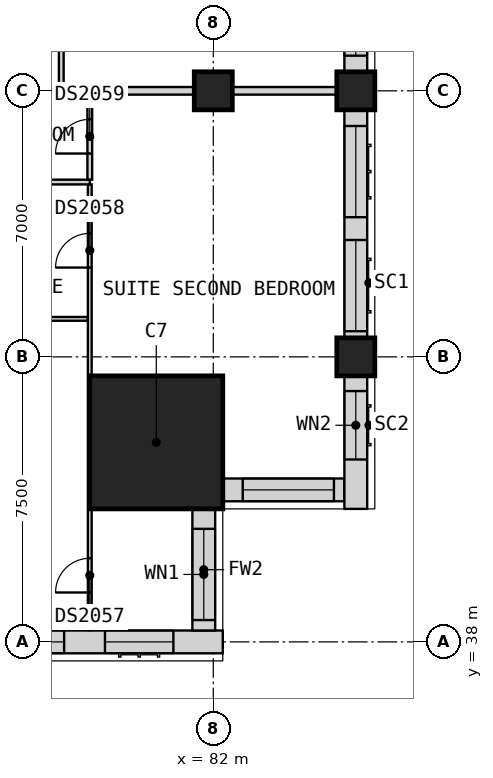
"""IFC4 building model, lengths in metres.
Left out: names, types, materials, properties, quantities, classifications, styles, units other than length and angle.
Written with IfcOpenShell. Run it as: python <this file> out.ifc"""

import sys

from ifc_helpers import new_model, si_unit, direction, frame, frame_2d, origin, origin_2d, place, context, subcontext, project, spatial, rectangle, extrude, element, fill, save


model = new_model("IFC4")
c1 = context("Model", 3, precision=1e-05, world=origin(), true_north=direction((0.0, 1.0)))
c2 = subcontext(c1, "Body", "Model", "MODEL_VIEW")
j1 = project(units=[si_unit("LENGTHUNIT", "METRE"), si_unit("PLANEANGLEUNIT", "RADIAN")], contexts=[c1])
p1 = place(None, origin())
s1 = spatial("IfcSite", under=j1, at=p1, CompositionType="ELEMENT")
p2 = place(p1, origin())
s2 = spatial("IfcBuilding", under=s1, at=p2, CompositionType="ELEMENT")
p3 = place(p2, frame((0.0, 0.0, 162.6)))
s3 = spatial("IfcBuildingStorey", under=s2, at=p3, CompositionType="ELEMENT", Elevation=162.6)
for number, where, z_axis, x_axis in (
    (1, (85.75, 45.5, 0.0), (0.0, 0.0, 1.0), (1.0, 0.0, 0.0)),
    (2, (85.75, 52.5, 0.0), (0.0, 0.0, 1.0), (1.0, 0.0, 0.0)),
    (3, (82.0, 52.5, 0.0), (0.0, 0.0, 1.0), (1.0, 0.0, 0.0)),
):
    element("IfcColumn", number, at=place(p3, frame(where, z_axis=z_axis, x_axis=x_axis)), inside=s3, PredefinedType="COLUMN", context=c2, shape_type="SweptSolid", body=[
        extrude(rectangle(XDim=1.0, YDim=1.0, at=origin_2d()), origin(), (0.0, 0.0, 1.0), 3.6),
    ])
p4 = place(p3, frame((80.5, 43.25, 0.0), z_axis=(0.0, 0.0, 1.0), x_axis=(1.0, 0.0, 0.0)))
e4 = element("IfcColumn", 4, at=p4, inside=s3, PredefinedType="COLUMN", context=c2, shape_type="SweptSolid", body=[
    extrude(rectangle(XDim=3.5, YDim=3.5, at=origin_2d()), origin(), (0.0, 0.0, 1.0), 3.6),
])
p5 = place(p3, frame((75.0, 38.0, 0.0), z_axis=(0.0, 0.0, 1.0), x_axis=(1.0, 0.0, 0.0)))
e5 = element("IfcWall", 5, at=p5, inside=s3, PredefinedType="SOLIDWALL", context=c2, shape_type="SweptSolid", body=[
    extrude(rectangle(XDim=7.25, YDim=0.6, at=frame_2d((3.625, 0.0))), origin(), (0.0, 0.0, 1.0), 2.85),
])
p6 = place(p5, frame((0.675, 0.0, 0.8)))
e6 = element("IfcOpeningElement", 6, at=p6, cuts=e5, PredefinedType="OPENING", context=c2, shape_type="SweptSolid", body=[
    extrude(rectangle(XDim=2.4, YDim=1.8, at=frame_2d((1.2, 0.9))), frame((0.0, 0.31, 0.0), z_axis=(0.0, -1.0, 0.0), x_axis=(1.0, 0.0, 0.0)), (0.0, 0.0, 1.0), 0.62),
])
p7 = place(p5, frame((4.15, 0.0, 0.8)))
e7 = element("IfcOpeningElement", 7, at=p7, cuts=e5, PredefinedType="OPENING", context=c2, shape_type="SweptSolid", body=[
    extrude(rectangle(XDim=1.8, YDim=1.8, at=frame_2d((0.9, 0.9))), frame((0.0, 0.31, 0.0), z_axis=(0.0, -1.0, 0.0), x_axis=(1.0, 0.0, 0.0)), (0.0, 0.0, 1.0), 0.62),
])
p8 = place(p3, frame((81.75, 38.3, 0.0), z_axis=(0.0, 0.0, 1.0), x_axis=(0.0, 1.0, 0.0)))
e8 = element("IfcWall", 8, at=p8, inside=s3, PredefinedType="SOLIDWALL", context=c2, shape_type="SweptSolid", body=[
    extrude(rectangle(XDim=3.2, YDim=0.6, at=frame_2d((1.6, 0.0))), origin(), (0.0, 0.0, 1.0), 3.2),
])
p9 = place(p8, frame((0.275, 0.0, 0.8)))
e9 = element("IfcOpeningElement", 9, at=p9, cuts=e8, PredefinedType="OPENING", context=c2, shape_type="SweptSolid", body=[
    extrude(rectangle(XDim=2.4, YDim=1.8, at=frame_2d((1.2, 0.9))), frame((0.0, 0.31, 0.0), z_axis=(0.0, -1.0, 0.0), x_axis=(1.0, 0.0, 0.0)), (0.0, 0.0, 1.0), 0.62),
])
p10 = place(p3, frame((82.25, 42.0, 0.0), z_axis=(0.0, 0.0, 1.0), x_axis=(1.0, 0.0, 0.0)))
e10 = element("IfcWall", 10, at=p10, inside=s3, PredefinedType="SOLIDWALL", context=c2, shape_type="SweptSolid", body=[
    extrude(rectangle(XDim=3.2, YDim=0.6, at=frame_2d((1.6, 0.0))), origin(), (0.0, 0.0, 1.0), 3.2),
])
p11 = place(p10, frame((0.525, 0.0, 0.8)))
e11 = element("IfcOpeningElement", 11, at=p11, cuts=e10, PredefinedType="OPENING", context=c2, shape_type="SweptSolid", body=[
    extrude(rectangle(XDim=2.4, YDim=1.8, at=frame_2d((1.2, 0.9))), frame((0.0, 0.31, 0.0), z_axis=(0.0, -1.0, 0.0), x_axis=(1.0, 0.0, 0.0)), (0.0, 0.0, 1.0), 0.62),
])
p12 = place(p3, frame((85.75, 41.5, 0.0), z_axis=(0.0, 0.0, 1.0), x_axis=(0.0, 1.0, 0.0)))
e12 = element("IfcWall", 12, at=p12, inside=s3, PredefinedType="SOLIDWALL", context=c2, shape_type="SweptSolid", body=[
    extrude(rectangle(XDim=3.5, YDim=0.6, at=frame_2d((1.75, 0.0))), origin(), (0.0, 0.0, 1.0), 3.2),
])
p13 = place(p12, frame((1.3, 0.0, 0.8)))
e13 = element("IfcOpeningElement", 13, at=p13, cuts=e12, PredefinedType="OPENING", context=c2, shape_type="SweptSolid", body=[
    extrude(rectangle(XDim=1.8, YDim=1.8, at=frame_2d((0.9, 0.9))), frame((0.0, 0.31, 0.0), z_axis=(0.0, -1.0, 0.0), x_axis=(1.0, 0.0, 0.0)), (0.0, 0.0, 1.0), 0.62),
])
p14 = place(p3, frame((85.75, 46.0, 0.0), z_axis=(0.0, 0.0, 1.0), x_axis=(0.0, 1.0, 0.0)))
e14 = element("IfcWall", 14, at=p14, inside=s3, PredefinedType="SOLIDWALL", context=c2, shape_type="SweptSolid", body=[
    extrude(rectangle(XDim=6.0, YDim=0.6, at=frame_2d((3.0, 0.0))), origin(), (0.0, 0.0, 1.0), 2.85),
])
p15 = place(p14, frame((0.175, 0.0, 0.8)))
e15 = element("IfcOpeningElement", 15, at=p15, cuts=e14, PredefinedType="OPENING", context=c2, shape_type="SweptSolid", body=[
    extrude(rectangle(XDim=2.4, YDim=1.8, at=frame_2d((1.2, 0.9))), frame((0.0, 0.31, 0.0), z_axis=(0.0, -1.0, 0.0), x_axis=(1.0, 0.0, 0.0)), (0.0, 0.0, 1.0), 0.62),
])
p16 = place(p14, frame((3.175, 0.0, 0.8)))
e16 = element("IfcOpeningElement", 16, at=p16, cuts=e14, PredefinedType="OPENING", context=c2, shape_type="SweptSolid", body=[
    extrude(rectangle(XDim=2.4, YDim=1.8, at=frame_2d((1.2, 0.9))), frame((0.0, 0.31, 0.0), z_axis=(0.0, -1.0, 0.0), x_axis=(1.0, 0.0, 0.0)), (0.0, 0.0, 1.0), 0.62),
])
p17 = place(p3, frame((85.75, 53.0, 0.0), z_axis=(0.0, 0.0, 1.0), x_axis=(0.0, 1.0, 0.0)))
e17 = element("IfcWall", 17, at=p17, inside=s3, PredefinedType="SOLIDWALL", context=c2, shape_type="SweptSolid", body=[
    extrude(rectangle(XDim=6.5, YDim=0.6, at=frame_2d((3.25, 0.0))), origin(), (0.0, 0.0, 1.0), 2.85),
])
p18 = place(p17, frame((0.425, 0.0, 0.8)))
e18 = element("IfcOpeningElement", 18, at=p18, cuts=e17, PredefinedType="OPENING", context=c2, shape_type="SweptSolid", body=[
    extrude(rectangle(XDim=2.4, YDim=1.8, at=frame_2d((1.2, 0.9))), frame((0.0, 0.31, 0.0), z_axis=(0.0, -1.0, 0.0), x_axis=(1.0, 0.0, 0.0)), (0.0, 0.0, 1.0), 0.62),
])
p19 = place(p17, frame((3.675, 0.0, 0.8)))
e19 = element("IfcOpeningElement", 19, at=p19, cuts=e17, PredefinedType="OPENING", context=c2, shape_type="SweptSolid", body=[
    extrude(rectangle(XDim=2.4, YDim=1.8, at=frame_2d((1.2, 0.9))), frame((0.0, 0.31, 0.0), z_axis=(0.0, -1.0, 0.0), x_axis=(1.0, 0.0, 0.0)), (0.0, 0.0, 1.0), 0.62),
])
p20 = place(p3, frame((73.725, 52.5, 0.0), z_axis=(0.0, 0.0, 1.0), x_axis=(1.0, 0.0, 0.0)))
e20 = element("IfcWall", 20, at=p20, inside=s3, PredefinedType="PARTITIONING", context=c2, shape_type="SweptSolid", body=[
    extrude(rectangle(XDim=12.525, YDim=0.2, at=frame_2d((6.262, 0.0))), origin(), (0.0, 0.0, 1.0), 3.2),
])
p21 = place(p3, frame((78.8, 42.0, 0.0), z_axis=(0.0, 0.0, 1.0), x_axis=(1.0, 0.0, 0.0)))
e21 = element("IfcWall", 21, at=p21, inside=s3, PredefinedType="PARTITIONING", context=c2, shape_type="SweptSolid", body=[
    extrude(rectangle(XDim=3.44, YDim=0.1, at=frame_2d((1.72, 0.0))), origin(), (0.0, 0.0, 1.0), 3.2),
])
p22 = place(p3, frame((71.35, 46.5, 0.0), z_axis=(0.0, 0.0, 1.0), x_axis=(1.0, 0.0, 0.0)))
e22 = element("IfcWall", 22, at=p22, inside=s3, PredefinedType="PARTITIONING", context=c2, shape_type="SweptSolid", body=[
    extrude(rectangle(XDim=7.35, YDim=0.1, at=frame_2d((3.675, 0.0))), origin(), (0.0, 0.0, 1.0), 3.2),
])
p23 = place(p22, frame((0.65, 0.0, 0.0)))
e23 = element("IfcOpeningElement", 23, at=p23, cuts=e22, PredefinedType="OPENING", context=c2, shape_type="SweptSolid", body=[
    extrude(rectangle(XDim=0.9, YDim=2.1, at=frame_2d((0.45, 1.05))), frame((0.0, 0.06, 0.0), z_axis=(0.0, -1.0, 0.0), x_axis=(1.0, 0.0, 0.0)), (0.0, 0.0, 1.0), 0.12),
])
p24 = place(p3, frame((78.75, 38.31, 0.0), z_axis=(0.0, 0.0, 1.0), x_axis=(0.0, 1.0, 0.0)))
e24 = element("IfcWall", 24, at=p24, inside=s3, PredefinedType="PARTITIONING", context=c2, shape_type="SweptSolid", body=[
    extrude(rectangle(XDim=11.728, YDim=0.1, at=frame_2d((5.864, 0.0))), origin(), (0.0, 0.0, 1.0), 3.2),
])
p25 = place(p24, frame((0.99, 0.0, 0.0)))
e25 = element("IfcOpeningElement", 25, at=p25, cuts=e24, PredefinedType="OPENING", context=c2, shape_type="SweptSolid", body=[
    extrude(rectangle(XDim=0.9, YDim=2.1, at=frame_2d((0.45, 1.05))), frame((0.0, 0.06, 0.0), z_axis=(0.0, -1.0, 0.0), x_axis=(1.0, 0.0, 0.0)), (0.0, 0.0, 1.0), 0.12),
])
p26 = place(p24, frame((9.54, 0.0, 0.0)))
e26 = element("IfcOpeningElement", 26, at=p26, cuts=e24, PredefinedType="OPENING", context=c2, shape_type="SweptSolid", body=[
    extrude(rectangle(XDim=0.9, YDim=2.1, at=frame_2d((0.45, 1.05))), frame((0.0, 0.06, 0.0), z_axis=(0.0, -1.0, 0.0), x_axis=(1.0, 0.0, 0.0)), (0.0, 0.0, 1.0), 0.12),
])
p27 = place(p3, frame((73.725, 50.1, 0.0), z_axis=(0.0, 0.0, 1.0), x_axis=(1.0, 0.0, 0.0)))
e27 = element("IfcWall", 27, at=p27, inside=s3, PredefinedType="PARTITIONING", context=c2, shape_type="SweptSolid", body=[
    extrude(rectangle(XDim=5.025, YDim=0.125, at=frame_2d((2.512, 0.0))), origin(), (0.0, 0.0, 1.0), 3.2),
])
p28 = place(p3, frame((78.0, 52.6, 0.0), z_axis=(0.0, 0.0, 1.0), x_axis=(0.0, 1.0, 0.0)))
e28 = element("IfcWall", 28, at=p28, inside=s3, PredefinedType="PARTITIONING", context=c2, shape_type="SweptSolid", body=[
    extrude(rectangle(XDim=4.337, YDim=0.125, at=frame_2d((2.169, 0.0))), origin(), (0.0, 0.0, 1.0), 3.2),
])
p29 = place(p28, frame((1.7, 0.0, 0.0)))
e29 = element("IfcOpeningElement", 29, at=p29, cuts=e28, PredefinedType="OPENING", context=c2, shape_type="SweptSolid", body=[
    extrude(rectangle(XDim=0.9, YDim=2.1, at=frame_2d((0.45, 1.05))), frame((0.0, 0.073, 0.0), z_axis=(0.0, -1.0, 0.0), x_axis=(1.0, 0.0, 0.0)), (0.0, 0.0, 1.0), 0.145),
])
p30 = place(p3, frame((78.75, 50.163, 0.0), z_axis=(0.0, 0.0, 1.0), x_axis=(0.0, 1.0, 0.0)))
e30 = element("IfcWall", 30, at=p30, inside=s3, PredefinedType="PARTITIONING", context=c2, shape_type="SweptSolid", body=[
    extrude(rectangle(XDim=2.237, YDim=0.125, at=frame_2d((1.119, 0.0))), origin(), (0.0, 0.0, 1.0), 3.2),
])
p31 = place(p30, frame((0.688, 0.0, 0.0)))
e31 = element("IfcOpeningElement", 31, at=p31, cuts=e30, PredefinedType="OPENING", context=c2, shape_type="SweptSolid", body=[
    extrude(rectangle(XDim=0.9, YDim=2.1, at=frame_2d((0.45, 1.05))), frame((0.0, 0.073, 0.0), z_axis=(0.0, -1.0, 0.0), x_axis=(1.0, 0.0, 0.0)), (0.0, 0.0, 1.0), 0.145),
])
p32 = place(p6, origin())
e32 = element("IfcWindow", 32, at=p32, inside=s3, PartitioningType="SINGLE_PANEL", PredefinedType="WINDOW", context=c2, shape_type="SweptSolid", body=[
    extrude(rectangle(XDim=2.4, YDim=1.8, at=frame_2d((1.2, 0.9))), frame((0.0, -0.07, 0.0), z_axis=(0.0, -1.0, 0.0), x_axis=(1.0, 0.0, 0.0)), (0.0, 0.0, 1.0), 0.06),
])
fill(e6, e32)
p33 = place(p7, origin())
e33 = element("IfcWindow", 33, at=p33, inside=s3, PartitioningType="SINGLE_PANEL", PredefinedType="WINDOW", context=c2, shape_type="SweptSolid", body=[
    extrude(rectangle(XDim=1.8, YDim=1.8, at=frame_2d((0.9, 0.9))), frame((0.0, -0.07, 0.0), z_axis=(0.0, -1.0, 0.0), x_axis=(1.0, 0.0, 0.0)), (0.0, 0.0, 1.0), 0.06),
])
fill(e7, e33)
p34 = place(p9, origin())
e34 = element("IfcWindow", 34, at=p34, inside=s3, PartitioningType="SINGLE_PANEL", PredefinedType="WINDOW", context=c2, shape_type="SweptSolid", body=[
    extrude(rectangle(XDim=2.4, YDim=1.8, at=frame_2d((1.2, 0.9))), frame((0.0, -0.07, 0.0), z_axis=(0.0, -1.0, 0.0), x_axis=(1.0, 0.0, 0.0)), (0.0, 0.0, 1.0), 0.06),
])
fill(e9, e34)
p35 = place(p11, origin())
e35 = element("IfcWindow", 35, at=p35, inside=s3, PartitioningType="SINGLE_PANEL", PredefinedType="WINDOW", context=c2, shape_type="SweptSolid", body=[
    extrude(rectangle(XDim=2.4, YDim=1.8, at=frame_2d((1.2, 0.9))), frame((0.0, -0.07, 0.0), z_axis=(0.0, -1.0, 0.0), x_axis=(1.0, 0.0, 0.0)), (0.0, 0.0, 1.0), 0.06),
])
fill(e11, e35)
p36 = place(p13, origin())
e36 = element("IfcWindow", 36, at=p36, inside=s3, PartitioningType="SINGLE_PANEL", PredefinedType="WINDOW", context=c2, shape_type="SweptSolid", body=[
    extrude(rectangle(XDim=1.8, YDim=1.8, at=frame_2d((0.9, 0.9))), frame((0.0, -0.07, 0.0), z_axis=(0.0, -1.0, 0.0), x_axis=(1.0, 0.0, 0.0)), (0.0, 0.0, 1.0), 0.06),
])
fill(e13, e36)
p37 = place(p15, origin())
e37 = element("IfcWindow", 37, at=p37, inside=s3, PartitioningType="SINGLE_PANEL", PredefinedType="WINDOW", context=c2, shape_type="SweptSolid", body=[
    extrude(rectangle(XDim=2.4, YDim=1.8, at=frame_2d((1.2, 0.9))), frame((0.0, -0.07, 0.0), z_axis=(0.0, -1.0, 0.0), x_axis=(1.0, 0.0, 0.0)), (0.0, 0.0, 1.0), 0.06),
])
fill(e15, e37)
p38 = place(p16, origin())
e38 = element("IfcWindow", 38, at=p38, inside=s3, PartitioningType="SINGLE_PANEL", PredefinedType="WINDOW", context=c2, shape_type="SweptSolid", body=[
    extrude(rectangle(XDim=2.4, YDim=1.8, at=frame_2d((1.2, 0.9))), frame((0.0, -0.07, 0.0), z_axis=(0.0, -1.0, 0.0), x_axis=(1.0, 0.0, 0.0)), (0.0, 0.0, 1.0), 0.06),
])
fill(e16, e38)
p39 = place(p18, origin())
e39 = element("IfcWindow", 39, at=p39, inside=s3, PartitioningType="SINGLE_PANEL", PredefinedType="WINDOW", context=c2, shape_type="SweptSolid", body=[
    extrude(rectangle(XDim=2.4, YDim=1.8, at=frame_2d((1.2, 0.9))), frame((0.0, -0.07, 0.0), z_axis=(0.0, -1.0, 0.0), x_axis=(1.0, 0.0, 0.0)), (0.0, 0.0, 1.0), 0.06),
])
fill(e18, e39)
p40 = place(p25, origin())
e40 = element("IfcDoor", 40, at=p40, inside=s3, OperationType="SINGLE_SWING_LEFT", PredefinedType="DOOR", context=c2, shape_type="SweptSolid", body=[
    extrude(rectangle(XDim=0.9, YDim=2.1, at=frame_2d((0.45, 1.05))), frame((0.0, 0.025, 0.0), z_axis=(0.0, -1.0, 0.0), x_axis=(1.0, 0.0, 0.0)), (0.0, 0.0, 1.0), 0.05),
])
fill(e25, e40)
p41 = place(p26, origin())
e41 = element("IfcDoor", 41, at=p41, inside=s3, OperationType="SINGLE_SWING_RIGHT", PredefinedType="DOOR", context=c2, shape_type="SweptSolid", body=[
    extrude(rectangle(XDim=0.9, YDim=2.1, at=frame_2d((0.45, 1.05))), frame((0.0, 0.025, 0.0), z_axis=(0.0, -1.0, 0.0), x_axis=(1.0, 0.0, 0.0)), (0.0, 0.0, 1.0), 0.05),
])
fill(e26, e41)
p42 = place(p31, origin())
e42 = element("IfcDoor", 42, at=p42, inside=s3, OperationType="SINGLE_SWING_LEFT", PredefinedType="DOOR", context=c2, shape_type="SweptSolid", body=[
    extrude(rectangle(XDim=0.9, YDim=2.1, at=frame_2d((0.45, 1.05))), frame((0.0, 0.025, 0.0), z_axis=(0.0, -1.0, 0.0), x_axis=(1.0, 0.0, 0.0)), (0.0, 0.0, 1.0), 0.05),
])
fill(e31, e42)
save(model, sys.argv[1])
